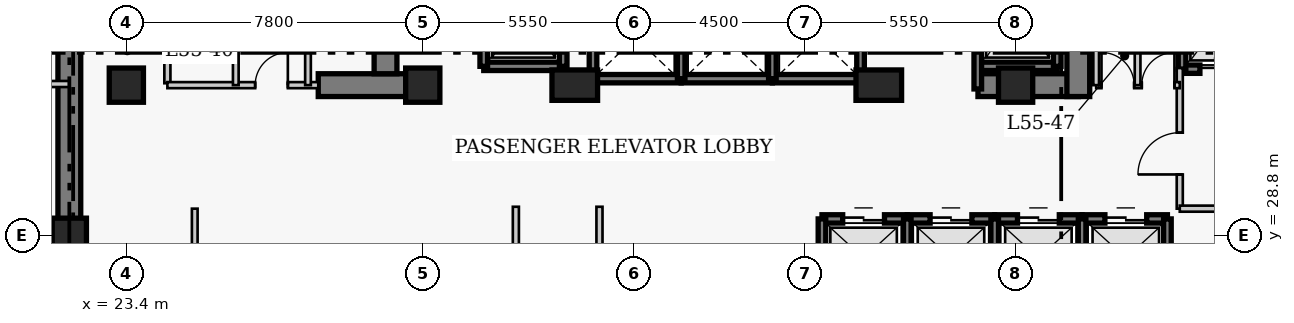
"""IFC4 building model, lengths in metres.
Left out: names, types, materials, properties, quantities, classifications, styles, units other than length and angle.
Written with IfcOpenShell. Run it as: python <this file> out.ifc"""

import sys

from ifc_helpers import new_model, si_unit, direction, frame, frame_2d, origin, origin_2d, place, context, subcontext, project, spatial, rectangle, extrude, element, fill, save


model = new_model("IFC4")
c1 = context("Model", 3, precision=1e-05, world=origin(), true_north=direction((0.0, 1.0)))
c2 = subcontext(c1, "Body", "Model", "MODEL_VIEW")
j1 = project(units=[si_unit("LENGTHUNIT", "METRE"), si_unit("PLANEANGLEUNIT", "RADIAN")], contexts=[c1])
p1 = place(None, origin())
s1 = spatial("IfcSite", under=j1, at=p1, CompositionType="ELEMENT")
p2 = place(p1, origin())
s2 = spatial("IfcBuilding", under=s1, at=p2, CompositionType="ELEMENT")
p3 = place(p2, frame((0.0, 0.0, 220.2)))
s3 = spatial("IfcBuildingStorey", under=s2, at=p3, CompositionType="ELEMENT", Elevation=220.2)
p4 = place(p3, frame((21.9, 27.05, 0.0), z_axis=(0.0, 0.0, 1.0), x_axis=(0.0, 1.0, 0.0)))
e1 = element("IfcWall", 1, at=p4, inside=s3, PredefinedType="SHEAR", context=c2, shape_type="SweptSolid", body=[
    extrude(rectangle(XDim=13.57, YDim=0.6, at=frame_2d((6.785, 0.0))), origin(), (0.0, 0.0, 1.0), 3.9),
])
p5 = place(p3, frame((28.45, 32.75, 0.0), z_axis=(0.0, 0.0, 1.0), x_axis=(1.0, 0.0, 0.0)))
e2 = element("IfcWall", 2, at=p5, inside=s3, PredefinedType="SHEAR", context=c2, shape_type="SweptSolid", body=[
    extrude(rectangle(XDim=2.4, YDim=0.6, at=frame_2d((1.2, 0.0))), origin(), (0.0, 0.0, 1.0), 3.9),
])
p6 = place(p3, frame((45.81, 32.75, 0.0), z_axis=(0.0, 0.0, 1.0), x_axis=(1.0, 0.0, 0.0)))
e3 = element("IfcWall", 3, at=p6, inside=s3, PredefinedType="SHEAR", context=c2, shape_type="SweptSolid", body=[
    extrude(rectangle(XDim=2.64, YDim=0.6, at=frame_2d((1.32, 0.0))), origin(), (0.0, 0.0, 1.0), 3.9),
])
p7 = place(p3, frame((30.22, 33.05, 0.0), z_axis=(0.0, 0.0, 1.0), x_axis=(0.0, 1.0, 0.0)))
e4 = element("IfcWall", 4, at=p7, inside=s3, PredefinedType="SHEAR", context=c2, shape_type="SweptSolid", body=[
    extrude(rectangle(XDim=7.27, YDim=0.6, at=frame_2d((3.635, 0.0))), origin(), (0.0, 0.0, 1.0), 3.9),
])
p8 = place(p3, frame((48.45, 32.45, 0.0), z_axis=(0.0, 0.0, 1.0), x_axis=(0.0, 1.0, 0.0)))
e5 = element("IfcWall", 5, at=p8, inside=s3, PredefinedType="SHEAR", context=c2, shape_type="SweptSolid", body=[
    extrude(rectangle(XDim=7.87, YDim=0.6, at=frame_2d((3.935, 0.0))), origin(), (0.0, 0.0, 1.0), 3.9),
])
p9 = place(p8, frame((5.75, 0.0, 0.0)))
e6 = element("IfcOpeningElement", 6, at=p9, cuts=e5, PredefinedType="OPENING", context=c2, shape_type="SweptSolid", body=[
    extrude(rectangle(XDim=1.1, YDim=2.15, at=frame_2d((0.55, 1.075))), frame((0.0, 0.31, 0.0), z_axis=(0.0, -1.0, 0.0), x_axis=(1.0, 0.0, 0.0)), (0.0, 0.0, 1.0), 0.62),
])
for number, where, z_axis, x_axis in (
    (7, (21.9, 28.8, 0.0), (0.0, 0.0, 1.0), (1.0, 0.0, 0.0)),
    (8, (23.4, 32.75, 0.0), (0.0, 0.0, 1.0), (1.0, 0.0, 0.0)),
    (9, (31.2, 32.75, 0.0), (0.0, 0.0, 1.0), (1.0, 0.0, 0.0)),
):
    element("IfcColumn", number, at=place(p3, frame(where, z_axis=z_axis, x_axis=x_axis)), inside=s3, PredefinedType="COLUMN", context=c2, shape_type="SweptSolid", body=[
        extrude(rectangle(XDim=0.9, YDim=0.9, at=origin_2d()), origin(), (0.0, 0.0, 1.0), 3.9),
    ])
for number, where, z_axis, x_axis in (
    (10, (35.2, 32.75, 0.0), (0.0, 0.0, 1.0), (1.0, 0.0, 0.0)),
    (11, (43.2, 32.75, 0.0), (0.0, 0.0, 1.0), (1.0, 0.0, 0.0)),
):
    element("IfcColumn", number, at=place(p3, frame(where, z_axis=z_axis, x_axis=x_axis)), inside=s3, PredefinedType="COLUMN", context=c2, shape_type="SweptSolid", body=[
        extrude(rectangle(XDim=1.2, YDim=0.8, at=origin_2d()), origin(), (0.0, 0.0, 1.0), 3.9),
    ])
p10 = place(p3, frame((46.8, 32.75, 0.0), z_axis=(0.0, 0.0, 1.0), x_axis=(1.0, 0.0, 0.0)))
e12 = element("IfcColumn", 12, at=p10, inside=s3, PredefinedType="COLUMN", context=c2, shape_type="SweptSolid", body=[
    extrude(rectangle(XDim=0.9, YDim=0.9, at=origin_2d()), origin(), (0.0, 0.0, 1.0), 3.9),
])
p11 = place(p3, frame((41.705, 29.23, 0.0), z_axis=(0.0, 0.0, 1.0), x_axis=(1.0, 0.0, 0.0)))
e13 = element("IfcWall", 13, at=p11, inside=s3, PredefinedType="SHEAR", context=c2, shape_type="SweptSolid", body=[
    extrude(rectangle(XDim=2.245, YDim=0.22, at=frame_2d((1.123, 0.0))), origin(), (0.0, 0.0, 1.0), 3.9),
])
p12 = place(p11, frame((0.545, 0.0, 0.0)))
e14 = element("IfcOpeningElement", 14, at=p12, cuts=e13, PredefinedType="OPENING", context=c2, shape_type="SweptSolid", body=[
    extrude(rectangle(XDim=1.1, YDim=2.15, at=frame_2d((0.55, 1.075))), frame((0.0, 0.12, 0.0), z_axis=(0.0, -1.0, 0.0), x_axis=(1.0, 0.0, 0.0)), (0.0, 0.0, 1.0), 0.24),
])
p13 = place(p3, frame((41.705, 27.17, 0.0), z_axis=(0.0, 0.0, 1.0), x_axis=(0.0, 1.0, 0.0)))
e15 = element("IfcWall", 15, at=p13, inside=s3, PredefinedType="SHEAR", context=c2, shape_type="SweptSolid", body=[
    extrude(rectangle(XDim=2.06, YDim=0.2, at=frame_2d((1.03, 0.0))), origin(), (0.0, 0.0, 1.0), 3.9),
])
p14 = place(p3, frame((43.95, 29.23, 0.0), z_axis=(0.0, 0.0, 1.0), x_axis=(1.0, 0.0, 0.0)))
e16 = element("IfcWall", 16, at=p14, inside=s3, PredefinedType="SHEAR", context=c2, shape_type="SweptSolid", body=[
    extrude(rectangle(XDim=2.3, YDim=0.22, at=frame_2d((1.15, 0.0))), origin(), (0.0, 0.0, 1.0), 3.9),
])
p15 = place(p14, frame((0.6, 0.0, 0.0)))
e17 = element("IfcOpeningElement", 17, at=p15, cuts=e16, PredefinedType="OPENING", context=c2, shape_type="SweptSolid", body=[
    extrude(rectangle(XDim=1.1, YDim=2.15, at=frame_2d((0.55, 1.075))), frame((0.0, 0.12, 0.0), z_axis=(0.0, -1.0, 0.0), x_axis=(1.0, 0.0, 0.0)), (0.0, 0.0, 1.0), 0.24),
])
p16 = place(p3, frame((43.95, 27.17, 0.0), z_axis=(0.0, 0.0, 1.0), x_axis=(0.0, 1.0, 0.0)))
e18 = element("IfcWall", 18, at=p16, inside=s3, PredefinedType="SHEAR", context=c2, shape_type="SweptSolid", body=[
    extrude(rectangle(XDim=2.06, YDim=0.2, at=frame_2d((1.03, 0.0))), origin(), (0.0, 0.0, 1.0), 3.9),
])
p17 = place(p3, frame((46.25, 29.23, 0.0), z_axis=(0.0, 0.0, 1.0), x_axis=(1.0, 0.0, 0.0)))
e19 = element("IfcWall", 19, at=p17, inside=s3, PredefinedType="SHEAR", context=c2, shape_type="SweptSolid", body=[
    extrude(rectangle(XDim=2.3, YDim=0.22, at=frame_2d((1.15, 0.0))), origin(), (0.0, 0.0, 1.0), 3.9),
])
p18 = place(p17, frame((0.6, 0.0, 0.0)))
e20 = element("IfcOpeningElement", 20, at=p18, cuts=e19, PredefinedType="OPENING", context=c2, shape_type="SweptSolid", body=[
    extrude(rectangle(XDim=1.1, YDim=2.15, at=frame_2d((0.55, 1.075))), frame((0.0, 0.12, 0.0), z_axis=(0.0, -1.0, 0.0), x_axis=(1.0, 0.0, 0.0)), (0.0, 0.0, 1.0), 0.24),
])
p19 = place(p3, frame((46.25, 27.17, 0.0), z_axis=(0.0, 0.0, 1.0), x_axis=(0.0, 1.0, 0.0)))
e21 = element("IfcWall", 21, at=p19, inside=s3, PredefinedType="SHEAR", context=c2, shape_type="SweptSolid", body=[
    extrude(rectangle(XDim=2.06, YDim=0.2, at=frame_2d((1.03, 0.0))), origin(), (0.0, 0.0, 1.0), 3.9),
])
p20 = place(p3, frame((48.55, 29.23, 0.0), z_axis=(0.0, 0.0, 1.0), x_axis=(1.0, 0.0, 0.0)))
e22 = element("IfcWall", 22, at=p20, inside=s3, PredefinedType="SHEAR", context=c2, shape_type="SweptSolid", body=[
    extrude(rectangle(XDim=2.245, YDim=0.22, at=frame_2d((1.123, 0.0))), origin(), (0.0, 0.0, 1.0), 3.9),
])
p21 = place(p20, frame((0.6, 0.0, 0.0)))
e23 = element("IfcOpeningElement", 23, at=p21, cuts=e22, PredefinedType="OPENING", context=c2, shape_type="SweptSolid", body=[
    extrude(rectangle(XDim=1.1, YDim=2.15, at=frame_2d((0.55, 1.075))), frame((0.0, 0.12, 0.0), z_axis=(0.0, -1.0, 0.0), x_axis=(1.0, 0.0, 0.0)), (0.0, 0.0, 1.0), 0.24),
])
for number, where, z_axis, x_axis in (
    (24, (48.55, 27.17, 0.0), (0.0, 0.0, 1.0), (0.0, 1.0, 0.0)),
    (25, (50.795, 27.17, 0.0), (0.0, 0.0, 1.0), (0.0, 1.0, 0.0)),
):
    element("IfcWall", number, at=place(p3, frame(where, z_axis=z_axis, x_axis=x_axis)), inside=s3, PredefinedType="SHEAR", context=c2, shape_type="SweptSolid", body=[
        extrude(rectangle(XDim=2.06, YDim=0.2, at=frame_2d((1.03, 0.0))), origin(), (0.0, 0.0, 1.0), 3.9),
    ])
p22 = place(p3, frame((35.68, 32.92, 0.0), z_axis=(0.0, 0.0, 1.0), x_axis=(1.0, 0.0, 0.0)))
e26 = element("IfcWall", 26, at=p22, inside=s3, PredefinedType="SHEAR", context=c2, shape_type="SweptSolid", body=[
    extrude(rectangle(XDim=2.32, YDim=0.22, at=frame_2d((1.16, 0.0))), origin(), (0.0, 0.0, 1.0), 3.9),
])
p23 = place(p3, frame((35.68, 32.92, 0.0), z_axis=(0.0, 0.0, 1.0), x_axis=(0.0, 1.0, 0.0)))
e27 = element("IfcWall", 27, at=p23, inside=s3, PredefinedType="SHEAR", context=c2, shape_type="SweptSolid", body=[
    extrude(rectangle(XDim=2.16, YDim=0.2, at=frame_2d((1.08, 0.0))), origin(), (0.0, 0.0, 1.0), 3.9),
])
p24 = place(p3, frame((38.0, 32.92, 0.0), z_axis=(0.0, 0.0, 1.0), x_axis=(1.0, 0.0, 0.0)))
e28 = element("IfcWall", 28, at=p24, inside=s3, PredefinedType="SHEAR", context=c2, shape_type="SweptSolid", body=[
    extrude(rectangle(XDim=2.4, YDim=0.22, at=frame_2d((1.2, 0.0))), origin(), (0.0, 0.0, 1.0), 3.9),
])
p25 = place(p3, frame((38.0, 32.92, 0.0), z_axis=(0.0, 0.0, 1.0), x_axis=(0.0, 1.0, 0.0)))
e29 = element("IfcWall", 29, at=p25, inside=s3, PredefinedType="SHEAR", context=c2, shape_type="SweptSolid", body=[
    extrude(rectangle(XDim=2.16, YDim=0.2, at=frame_2d((1.08, 0.0))), origin(), (0.0, 0.0, 1.0), 3.9),
])
p26 = place(p3, frame((40.4, 32.92, 0.0), z_axis=(0.0, 0.0, 1.0), x_axis=(1.0, 0.0, 0.0)))
e30 = element("IfcWall", 30, at=p26, inside=s3, PredefinedType="SHEAR", context=c2, shape_type="SweptSolid", body=[
    extrude(rectangle(XDim=2.32, YDim=0.22, at=frame_2d((1.16, 0.0))), origin(), (0.0, 0.0, 1.0), 3.9),
])
for number, where, z_axis, x_axis in (
    (31, (40.4, 32.92, 0.0), (0.0, 0.0, 1.0), (0.0, 1.0, 0.0)),
    (32, (42.72, 32.92, 0.0), (0.0, 0.0, 1.0), (0.0, 1.0, 0.0)),
):
    element("IfcWall", number, at=place(p3, frame(where, z_axis=z_axis, x_axis=x_axis)), inside=s3, PredefinedType="SHEAR", context=c2, shape_type="SweptSolid", body=[
        extrude(rectangle(XDim=2.16, YDim=0.2, at=frame_2d((1.08, 0.0))), origin(), (0.0, 0.0, 1.0), 3.9),
    ])
p27 = place(p3, frame((51.18, 33.17, 0.0), z_axis=(0.0, 0.0, 1.0), x_axis=(1.0, 0.0, 0.0)))
e33 = element("IfcWall", 33, at=p27, inside=s3, PredefinedType="SHEAR", context=c2, shape_type="SweptSolid", body=[
    extrude(rectangle(XDim=2.42, YDim=0.22, at=frame_2d((1.21, 0.0))), origin(), (0.0, 0.0, 1.0), 3.9),
])
p28 = place(p27, frame((0.47, 0.0, 0.0)))
e34 = element("IfcOpeningElement", 34, at=p28, cuts=e33, PredefinedType="OPENING", context=c2, shape_type="SweptSolid", body=[
    extrude(rectangle(XDim=1.3, YDim=2.15, at=frame_2d((0.65, 1.075))), frame((0.0, 0.12, 0.0), z_axis=(0.0, -1.0, 0.0), x_axis=(1.0, 0.0, 0.0)), (0.0, 0.0, 1.0), 0.24),
])
p29 = place(p3, frame((51.18, 33.17, 0.0), z_axis=(0.0, 0.0, 1.0), x_axis=(0.0, 1.0, 0.0)))
e35 = element("IfcWall", 35, at=p29, inside=s3, PredefinedType="SHEAR", context=c2, shape_type="SweptSolid", body=[
    extrude(rectangle(XDim=2.86, YDim=0.2, at=frame_2d((1.43, 0.0))), origin(), (0.0, 0.0, 1.0), 3.9),
])
p30 = place(p3, frame((32.805, 33.245, 0.0), z_axis=(0.0, 0.0, 1.0), x_axis=(1.0, 0.0, 0.0)))
e36 = element("IfcWall", 36, at=p30, inside=s3, PredefinedType="SHEAR", context=c2, shape_type="SweptSolid", body=[
    extrude(rectangle(XDim=2.09, YDim=0.22, at=frame_2d((1.045, 0.0))), origin(), (0.0, 0.0, 1.0), 3.9),
])
for number, where, z_axis, x_axis in (
    (37, (32.805, 33.245, 0.0), (0.0, 0.0, 1.0), (0.0, 1.0, 0.0)),
    (38, (34.895, 33.245, 0.0), (0.0, 0.0, 1.0), (0.0, 1.0, 0.0)),
):
    element("IfcWall", number, at=place(p3, frame(where, z_axis=z_axis, x_axis=x_axis)), inside=s3, PredefinedType="SHEAR", context=c2, shape_type="SweptSolid", body=[
        extrude(rectangle(XDim=2.91, YDim=0.2, at=frame_2d((1.455, 0.0))), origin(), (0.0, 0.0, 1.0), 3.9),
    ])
p31 = place(p3, frame((45.805, 33.245, 0.0), z_axis=(0.0, 0.0, 1.0), x_axis=(1.0, 0.0, 0.0)))
e39 = element("IfcWall", 39, at=p31, inside=s3, PredefinedType="SHEAR", context=c2, shape_type="SweptSolid", body=[
    extrude(rectangle(XDim=2.09, YDim=0.22, at=frame_2d((1.045, 0.0))), origin(), (0.0, 0.0, 1.0), 3.9),
])
p32 = place(p3, frame((45.805, 32.65, 0.0), z_axis=(0.0, 0.0, 1.0), x_axis=(0.0, 1.0, 0.0)))
e40 = element("IfcWall", 40, at=p32, inside=s3, PredefinedType="SHEAR", context=c2, shape_type="SweptSolid", body=[
    extrude(rectangle(XDim=3.505, YDim=0.2, at=frame_2d((1.752, 0.0))), origin(), (0.0, 0.0, 1.0), 3.9),
])
p33 = place(p3, frame((47.895, 33.245, 0.0), z_axis=(0.0, 0.0, 1.0), x_axis=(0.0, 1.0, 0.0)))
e41 = element("IfcWall", 41, at=p33, inside=s3, PredefinedType="SHEAR", context=c2, shape_type="SweptSolid", body=[
    extrude(rectangle(XDim=2.91, YDim=0.2, at=frame_2d((1.455, 0.0))), origin(), (0.0, 0.0, 1.0), 3.9),
])
p34 = place(p3, frame((24.48, 32.8, 0.0), z_axis=(0.0, 0.0, 1.0), x_axis=(0.0, 1.0, 0.0)))
e42 = element("IfcWall", 42, at=p34, inside=s3, PredefinedType="PARTITIONING", context=c2, shape_type="SweptSolid", body=[
    extrude(rectangle(XDim=3.57, YDim=0.16, at=frame_2d((1.785, 0.0))), origin(), (0.0, 0.0, 1.0), 3.65),
])
p35 = place(p34, frame((1.604, 0.0, 0.0)))
e43 = element("IfcOpeningElement", 43, at=p35, cuts=e42, PredefinedType="OPENING", context=c2, shape_type="SweptSolid", body=[
    extrude(rectangle(XDim=0.9, YDim=2.1, at=frame_2d((0.45, 1.05))), frame((0.0, 0.09, 0.0), z_axis=(0.0, -1.0, 0.0), x_axis=(1.0, 0.0, 0.0)), (0.0, 0.0, 1.0), 0.18),
])
p36 = place(p3, frame((51.12, 29.5, 0.0), z_axis=(0.0, 0.0, 1.0), x_axis=(0.0, 1.0, 0.0)))
e44 = element("IfcWall", 44, at=p36, inside=s3, PredefinedType="PARTITIONING", context=c2, shape_type="SweptSolid", body=[
    extrude(rectangle(XDim=3.7, YDim=0.16, at=frame_2d((1.85, 0.0))), origin(), (0.0, 0.0, 1.0), 3.65),
])
p37 = place(p36, frame((0.9, 0.0, 0.0)))
e45 = element("IfcOpeningElement", 45, at=p37, cuts=e44, PredefinedType="OPENING", context=c2, shape_type="SweptSolid", body=[
    extrude(rectangle(XDim=1.1, YDim=2.15, at=frame_2d((0.55, 1.075))), frame((0.0, 0.09, 0.0), z_axis=(0.0, -1.0, 0.0), x_axis=(1.0, 0.0, 0.0)), (0.0, 0.0, 1.0), 0.18),
])
p38 = place(p3, frame((51.12, 29.5, 0.0), z_axis=(0.0, 0.0, 1.0), x_axis=(1.0, 0.0, 0.0)))
e46 = element("IfcWall", 46, at=p38, inside=s3, PredefinedType="PARTITIONING", context=c2, shape_type="SweptSolid", body=[
    extrude(rectangle(XDim=5.63, YDim=0.16, at=frame_2d((2.815, 0.0))), origin(), (0.0, 0.0, 1.0), 3.65),
])
p39 = place(p3, frame((24.48, 32.75, 0.0), z_axis=(0.0, 0.0, 1.0), x_axis=(1.0, 0.0, 0.0)))
e47 = element("IfcWall", 47, at=p39, inside=s3, PredefinedType="PARTITIONING", context=c2, shape_type="SweptSolid", body=[
    extrude(rectangle(XDim=3.97, YDim=0.16, at=frame_2d((1.985, 0.0))), origin(), (0.0, 0.0, 1.0), 3.65),
])
p40 = place(p39, frame((2.31, 0.0, 0.0)))
e48 = element("IfcOpeningElement", 48, at=p40, cuts=e47, PredefinedType="OPENING", context=c2, shape_type="SweptSolid", body=[
    extrude(rectangle(XDim=0.86, YDim=2.05, at=frame_2d((0.43, 1.025))), frame((0.0, 0.09, 0.0), z_axis=(0.0, -1.0, 0.0), x_axis=(1.0, 0.0, 0.0)), (0.0, 0.0, 1.0), 0.18),
])
p41 = place(p3, frame((48.92, 32.75, 0.0), z_axis=(0.0, 0.0, 1.0), x_axis=(1.0, 0.0, 0.0)))
e49 = element("IfcWall", 49, at=p41, inside=s3, PredefinedType="PARTITIONING", context=c2, shape_type="SweptSolid", body=[
    extrude(rectangle(XDim=2.2, YDim=0.16, at=frame_2d((1.1, 0.0))), origin(), (0.0, 0.0, 1.0), 3.65),
])
p42 = place(p41, frame((0.14, 0.0, 0.0)))
e50 = element("IfcOpeningElement", 50, at=p42, cuts=e49, PredefinedType="OPENING", context=c2, shape_type="SweptSolid", body=[
    extrude(rectangle(XDim=0.86, YDim=2.05, at=frame_2d((0.43, 1.025))), frame((0.0, 0.09, 0.0), z_axis=(0.0, -1.0, 0.0), x_axis=(1.0, 0.0, 0.0)), (0.0, 0.0, 1.0), 0.18),
])
p43 = place(p41, frame((1.2, 0.0, 0.0)))
e51 = element("IfcOpeningElement", 51, at=p43, cuts=e49, PredefinedType="OPENING", context=c2, shape_type="SweptSolid", body=[
    extrude(rectangle(XDim=0.86, YDim=2.05, at=frame_2d((0.43, 1.025))), frame((0.0, 0.09, 0.0), z_axis=(0.0, -1.0, 0.0), x_axis=(1.0, 0.0, 0.0)), (0.0, 0.0, 1.0), 0.18),
])
for number, where, z_axis, x_axis in (
    (52, (48.92, 32.75, 0.0), (0.0, 0.0, 1.0), (0.0, 1.0, 0.0)),
    (53, (26.28, 32.75, 0.0), (0.0, 0.0, 1.0), (0.0, 1.0, 0.0)),
    (54, (28.18, 32.75, 0.0), (0.0, 0.0, 1.0), (0.0, 1.0, 0.0)),
    (55, (50.01, 32.75, 0.0), (0.0, 0.0, 1.0), (0.0, 1.0, 0.0)),
):
    element("IfcWall", number, at=place(p3, frame(where, z_axis=z_axis, x_axis=x_axis)), inside=s3, PredefinedType="PARTITIONING", context=c2, shape_type="SweptSolid", body=[
        extrude(rectangle(XDim=3.62, YDim=0.15, at=frame_2d((1.81, 0.0))), origin(), (0.0, 0.0, 1.0), 3.65),
    ])
for number, where, z_axis, x_axis in (
    (56, (33.65, 16.86, 0.0), (0.0, 0.0, 1.0), (0.0, 1.0, 0.0)),
    (57, (35.85, 16.86, 0.0), (0.0, 0.0, 1.0), (0.0, 1.0, 0.0)),
):
    element("IfcWall", number, at=place(p3, frame(where, z_axis=z_axis, x_axis=x_axis)), inside=s3, PredefinedType="PARTITIONING", context=c2, shape_type="SweptSolid", body=[
        extrude(rectangle(XDim=12.69, YDim=0.16, at=frame_2d((6.345, 0.0))), origin(), (0.0, 0.0, 1.0), 3.65),
    ])
p44 = place(p3, frame((18.86, 32.78, 0.0), z_axis=(0.0, 0.0, 1.0), x_axis=(1.0, 0.0, 0.0)))
e58 = element("IfcWall", 58, at=p44, inside=s3, PredefinedType="PARTITIONING", context=c2, shape_type="SweptSolid", body=[
    extrude(rectangle(XDim=3.04, YDim=0.16, at=frame_2d((1.52, 0.0))), origin(), (0.0, 0.0, 1.0), 3.65),
])
p45 = place(p3, frame((25.2, 16.86, 0.0), z_axis=(0.0, 0.0, 1.0), x_axis=(0.0, 1.0, 0.0)))
e59 = element("IfcWall", 59, at=p45, inside=s3, PredefinedType="PARTITIONING", context=c2, shape_type="SweptSolid", body=[
    extrude(rectangle(XDim=12.64, YDim=0.15, at=frame_2d((6.32, 0.0))), origin(), (0.0, 0.0, 1.0), 3.65),
])
p46 = place(p12, origin())
e60 = element("IfcDoor", 60, at=p46, inside=s3, OperationType="DOUBLE_DOOR_SLIDING", PredefinedType="DOOR", context=c2, shape_type="SweptSolid", body=[
    extrude(rectangle(XDim=1.1, YDim=2.15, at=frame_2d((0.55, 1.075))), frame((0.0, 0.025, 0.0), z_axis=(0.0, -1.0, 0.0), x_axis=(1.0, 0.0, 0.0)), (0.0, 0.0, 1.0), 0.05),
])
fill(e14, e60)
p47 = place(p15, origin())
e61 = element("IfcDoor", 61, at=p47, inside=s3, OperationType="DOUBLE_DOOR_SLIDING", PredefinedType="DOOR", context=c2, shape_type="SweptSolid", body=[
    extrude(rectangle(XDim=1.1, YDim=2.15, at=frame_2d((0.55, 1.075))), frame((0.0, 0.025, 0.0), z_axis=(0.0, -1.0, 0.0), x_axis=(1.0, 0.0, 0.0)), (0.0, 0.0, 1.0), 0.05),
])
fill(e17, e61)
p48 = place(p18, origin())
e62 = element("IfcDoor", 62, at=p48, inside=s3, OperationType="DOUBLE_DOOR_SLIDING", PredefinedType="DOOR", context=c2, shape_type="SweptSolid", body=[
    extrude(rectangle(XDim=1.1, YDim=2.15, at=frame_2d((0.55, 1.075))), frame((0.0, 0.025, 0.0), z_axis=(0.0, -1.0, 0.0), x_axis=(1.0, 0.0, 0.0)), (0.0, 0.0, 1.0), 0.05),
])
fill(e20, e62)
p49 = place(p21, origin())
e63 = element("IfcDoor", 63, at=p49, inside=s3, OperationType="DOUBLE_DOOR_SLIDING", PredefinedType="DOOR", context=c2, shape_type="SweptSolid", body=[
    extrude(rectangle(XDim=1.1, YDim=2.15, at=frame_2d((0.55, 1.075))), frame((0.0, 0.025, 0.0), z_axis=(0.0, -1.0, 0.0), x_axis=(1.0, 0.0, 0.0)), (0.0, 0.0, 1.0), 0.05),
])
fill(e23, e63)
p50 = place(p28, origin())
e64 = element("IfcDoor", 64, at=p50, inside=s3, OperationType="DOUBLE_DOOR_SLIDING", PredefinedType="DOOR", context=c2, shape_type="SweptSolid", body=[
    extrude(rectangle(XDim=1.3, YDim=2.15, at=frame_2d((0.65, 1.075))), frame((0.0, 0.025, 0.0), z_axis=(0.0, -1.0, 0.0), x_axis=(1.0, 0.0, 0.0)), (0.0, 0.0, 1.0), 0.05),
])
fill(e34, e64)
p51 = place(p37, origin())
e65 = element("IfcDoor", 65, at=p51, inside=s3, OperationType="SINGLE_SWING_LEFT", PredefinedType="DOOR", context=c2, shape_type="SweptSolid", body=[
    extrude(rectangle(XDim=1.1, YDim=2.15, at=frame_2d((0.55, 1.075))), frame((0.0, 0.025, 0.0), z_axis=(0.0, -1.0, 0.0), x_axis=(1.0, 0.0, 0.0)), (0.0, 0.0, 1.0), 0.05),
])
fill(e45, e65)
p52 = place(p40, origin())
e66 = element("IfcDoor", 66, at=p52, inside=s3, OperationType="SINGLE_SWING_RIGHT", PredefinedType="DOOR", context=c2, shape_type="SweptSolid", body=[
    extrude(rectangle(XDim=0.86, YDim=2.05, at=frame_2d((0.43, 1.025))), frame((0.0, 0.025, 0.0), z_axis=(0.0, -1.0, 0.0), x_axis=(1.0, 0.0, 0.0)), (0.0, 0.0, 1.0), 0.05),
])
fill(e48, e66)
p53 = place(p42, origin())
e67 = element("IfcDoor", 67, at=p53, inside=s3, OperationType="SINGLE_SWING_LEFT", PredefinedType="DOOR", context=c2, shape_type="SweptSolid", body=[
    extrude(rectangle(XDim=0.86, YDim=2.05, at=frame_2d((0.43, 1.025))), frame((0.0, 0.025, 0.0), z_axis=(0.0, -1.0, 0.0), x_axis=(1.0, 0.0, 0.0)), (0.0, 0.0, 1.0), 0.05),
])
fill(e50, e67)
p54 = place(p43, origin())
e68 = element("IfcDoor", 68, at=p54, inside=s3, OperationType="SINGLE_SWING_RIGHT", PredefinedType="DOOR", context=c2, shape_type="SweptSolid", body=[
    extrude(rectangle(XDim=0.86, YDim=2.05, at=frame_2d((0.43, 1.025))), frame((0.0, 0.025, 0.0), z_axis=(0.0, -1.0, 0.0), x_axis=(1.0, 0.0, 0.0)), (0.0, 0.0, 1.0), 0.05),
])
fill(e51, e68)
save(model, sys.argv[1])
